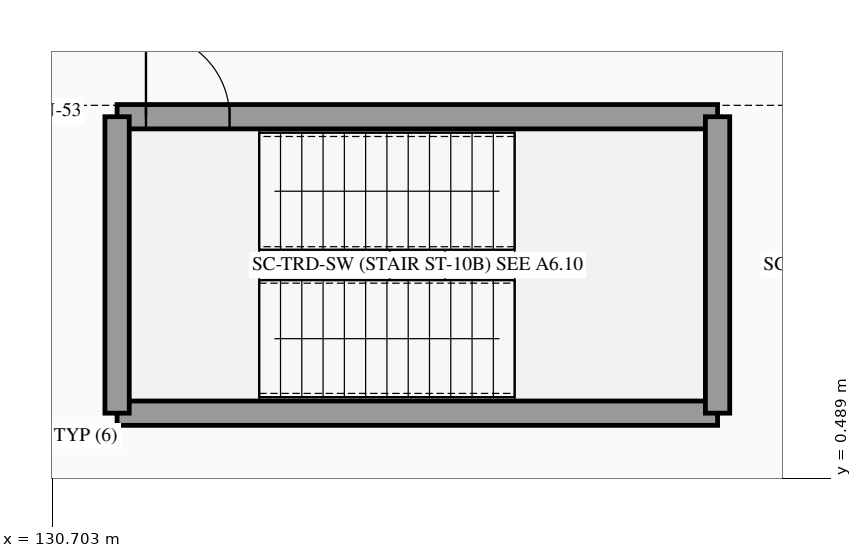
"""IFC4 building model, lengths in metres.
Left out: names, types, materials, properties, quantities, classifications, styles, units other than length and angle.
Written with IfcOpenShell. Run it as: python <this file> out.ifc"""

import sys

from ifc_helpers import new_model, si_unit, direction, frame, frame_2d, origin, place, context, subcontext, project, spatial, rectangle, extrude, element, fill, save


model = new_model("IFC4")
c1 = context("Model", 3, precision=1e-05, world=origin(), true_north=direction((0.0, 1.0)))
c2 = subcontext(c1, "Body", "Model", "MODEL_VIEW")
j1 = project(units=[si_unit("LENGTHUNIT", "METRE"), si_unit("PLANEANGLEUNIT", "RADIAN")], contexts=[c1])
p1 = place(None, origin())
s1 = spatial("IfcSite", under=j1, at=p1, CompositionType="ELEMENT")
p2 = place(p1, origin())
s2 = spatial("IfcBuilding", under=s1, at=p2, CompositionType="ELEMENT")
p3 = place(p2, frame((0.0, 0.0, 5.4)))
s3 = spatial("IfcBuildingStorey", under=s2, at=p3, CompositionType="ELEMENT", Elevation=5.4)
p4 = place(p3, frame((131.55, 1.35, 0.0), z_axis=(0.0, 0.0, 1.0), x_axis=(1.0, 0.0, 0.0)))
e1 = element("IfcWall", 1, at=p4, inside=s3, PredefinedType="SHEAR", context=c2, shape_type="SweptSolid", body=[
    extrude(rectangle(XDim=7.9, YDim=0.32, at=frame_2d((3.95, 0.0))), origin(), (0.0, 0.0, 1.0), 4.68),
])
p5 = place(p3, frame((131.55, 5.25, 0.0), z_axis=(0.0, 0.0, 1.0), x_axis=(1.0, 0.0, 0.0)))
e2 = element("IfcWall", 2, at=p5, inside=s3, PredefinedType="SHEAR", context=c2, shape_type="SweptSolid", body=[
    extrude(rectangle(XDim=7.9, YDim=0.32, at=frame_2d((3.95, 0.0))), origin(), (0.0, 0.0, 1.0), 4.68),
])
p6 = place(p5, frame((0.38, 0.0, 0.0)))
e3 = element("IfcOpeningElement", 3, at=p6, cuts=e2, PredefinedType="OPENING", context=c2, shape_type="SweptSolid", body=[
    extrude(rectangle(XDim=1.1, YDim=2.2, at=frame_2d((0.55, 1.1))), frame((0.0, 0.17, 0.0), z_axis=(0.0, -1.0, 0.0), x_axis=(1.0, 0.0, 0.0)), (0.0, 0.0, 1.0), 0.34),
])
for number, where, z_axis, x_axis in (
    (4, (131.55, 1.35, 0.0), (0.0, 0.0, 1.0), (0.0, 1.0, 0.0)),
    (5, (139.45, 1.35, 0.0), (0.0, 0.0, 1.0), (0.0, 1.0, 0.0)),
):
    element("IfcWall", number, at=place(p3, frame(where, z_axis=z_axis, x_axis=x_axis)), inside=s3, PredefinedType="SHEAR", context=c2, shape_type="SweptSolid", body=[
        extrude(rectangle(XDim=3.9, YDim=0.32, at=frame_2d((1.95, 0.0))), origin(), (0.0, 0.0, 1.0), 4.68),
    ])
p7 = place(p6, origin())
e6 = element("IfcDoor", 6, at=p7, inside=s3, OperationType="SINGLE_SWING_LEFT", PredefinedType="DOOR", context=c2, shape_type="SweptSolid", body=[
    extrude(rectangle(XDim=1.1, YDim=2.2, at=frame_2d((0.55, 1.1))), frame((0.0, 0.025, 0.0), z_axis=(0.0, -1.0, 0.0), x_axis=(1.0, 0.0, 0.0)), (0.0, 0.0, 1.0), 0.05),
])
fill(e3, e6)
save(model, sys.argv[1])
